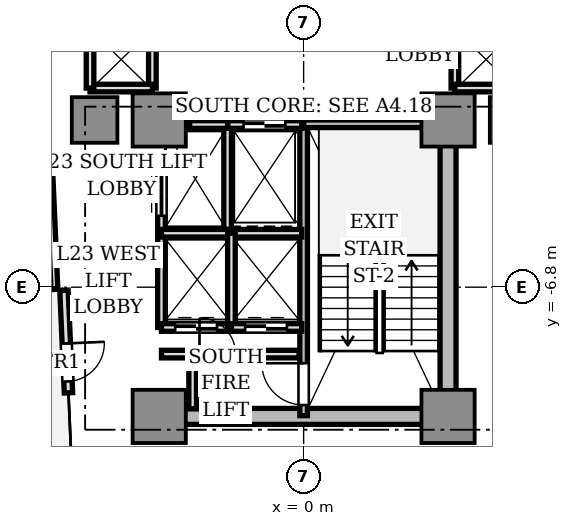
"""IFC4 building model, lengths in metres.
Left out: names, types, materials, properties, quantities, classifications, styles, units other than length and angle.
Written with IfcOpenShell. Run it as: python <this file> out.ifc"""

import sys

from ifc_helpers import new_model, si_unit, direction, frame, frame_2d, origin, origin_2d, place, context, subcontext, project, spatial, rectangle, extrude, source, transform, mapped, element, fill, save


model = new_model("IFC4")
c1 = context("Model", 3, precision=1e-05, world=origin(), true_north=direction((0.0, 1.0)))
c2 = subcontext(c1, "Body", "Model", "MODEL_VIEW")
j1 = project(units=[si_unit("LENGTHUNIT", "METRE"), si_unit("PLANEANGLEUNIT", "RADIAN")], contexts=[c1])
p1 = place(None, origin())
s1 = spatial("IfcSite", under=j1, at=p1, CompositionType="ELEMENT")
p2 = place(p1, origin())
s2 = spatial("IfcBuilding", under=s1, at=p2, CompositionType="ELEMENT")
p3 = place(p2, frame((0.0, 0.0, 86.85)))
s3 = spatial("IfcBuildingStorey", under=s2, at=p3, CompositionType="ELEMENT", Elevation=86.85)
p4 = place(p3, frame((-3.55, -10.2, 0.0), z_axis=(0.0, 0.0, 1.0), x_axis=(1.0, 0.0, 0.0)))
e1 = element("IfcWall", 1, at=p4, inside=s3, PredefinedType="SHEAR", context=c2, shape_type="SweptSolid", body=[
    extrude(rectangle(XDim=7.1, YDim=0.42, at=frame_2d((3.55, 0.0))), origin(), (0.0, 0.0, 1.0), 3.11),
])
p5 = place(p3, frame((3.8, -9.75, 0.0), z_axis=(0.0, 0.0, 1.0), x_axis=(0.0, 1.0, 0.0)))
e2 = element("IfcWall", 2, at=p5, inside=s3, PredefinedType="SHEAR", context=c2, shape_type="SweptSolid", body=[
    extrude(rectangle(XDim=6.9, YDim=0.42, at=frame_2d((3.45, 0.0))), origin(), (0.0, 0.0, 1.0), 3.11),
])
m1 = source(origin(), c2, "Body", "SweptSolid", [
    extrude(rectangle(XDim=1.4, YDim=1.4, at=origin_2d()), origin(), (0.0, 0.0, 1.0), 3.11),
])
for number, where, z_axis, x_axis in (
    (3, (-3.8, -2.4, 0.0), (0.0, 0.0, 1.0), (1.0, 0.0, 0.0)),
    (4, (3.8, -2.4, 0.0), (0.0, 0.0, 1.0), (1.0, 0.0, 0.0)),
    (5, (-3.8, -10.2, 0.0), (0.0, 0.0, 1.0), (1.0, 0.0, 0.0)),
    (6, (3.8, -10.2, 0.0), (0.0, 0.0, 1.0), (1.0, 0.0, 0.0)),
):
    element("IfcColumn", number, at=place(p3, frame(where, z_axis=z_axis, x_axis=x_axis)), inside=s3, PredefinedType="COLUMN", context=c2, shape_type="MappedRepresentation", body=[
        mapped(m1, transform((0.0, 0.0, 0.0), scale=1.0)),
    ])
m2 = source(origin(), c2, "Body", "SweptSolid", [
    extrude(rectangle(XDim=1.2, YDim=1.2, at=origin_2d()), origin(), (0.0, 0.0, 1.0), 3.11),
])
for number, where, z_axis, x_axis in (
    (7, (5.5, -2.4, 0.0), (0.0, 0.0, 1.0), (1.0, 0.0, 0.0)),
    (8, (-5.5, -2.4, 0.0), (0.0, 0.0, 1.0), (1.0, 0.0, 0.0)),
):
    element("IfcColumn", number, at=place(p3, frame(where, z_axis=z_axis, x_axis=x_axis)), inside=s3, PredefinedType="COLUMN", context=c2, shape_type="MappedRepresentation", body=[
        mapped(m2, transform((0.0, 0.0, 0.0), scale=1.0)),
    ])
p6 = place(p3, frame((-6.306, -6.882, 0.0), z_axis=(0.0, 0.0, 1.0), x_axis=(0.043672655174, -0.999045894436, 0.0)))
e9 = element("IfcWall", 9, at=p6, inside=s3, PredefinedType="STANDARD", context=c2, shape_type="SweptSolid", body=[
    extrude(rectangle(XDim=2.7, YDim=0.22, at=frame_2d((1.35, 0.0))), origin(), (0.0, 0.0, 1.0), 3.11),
])
p7 = place(p6, frame((1.4, 0.0, 0.0)))
e10 = element("IfcOpeningElement", 10, at=p7, cuts=e9, PredefinedType="OPENING", context=c2, shape_type="SweptSolid", body=[
    extrude(rectangle(XDim=1.0, YDim=2.2, at=frame_2d((0.5, 1.1))), frame((0.0, 0.12, 0.0), z_axis=(0.0, -1.0, 0.0), x_axis=(1.0, 0.0, 0.0)), (0.0, 0.0, 1.0), 0.24),
])
p8 = place(p3, frame((0.0, -10.18, 0.0), z_axis=(0.0, 0.0, 1.0), x_axis=(0.0, 1.0, 0.0)))
e11 = element("IfcWall", 11, at=p8, inside=s3, PredefinedType="SOLIDWALL", context=c2, shape_type="SweptSolid", body=[
    extrude(rectangle(XDim=7.68, YDim=0.2, at=frame_2d((3.84, 0.0))), origin(), (0.0, 0.0, 1.0), 3.11),
])
p9 = place(p8, frame((0.28, 0.0, 0.0)))
e12 = element("IfcOpeningElement", 12, at=p9, cuts=e11, PredefinedType="OPENING", context=c2, shape_type="SweptSolid", body=[
    extrude(rectangle(XDim=1.1, YDim=2.15, at=frame_2d((0.55, 1.075))), frame((0.0, 0.11, 0.0), z_axis=(0.0, -1.0, 0.0), x_axis=(1.0, 0.0, 0.0)), (0.0, 0.0, 1.0), 0.22),
])
p10 = place(p3, frame((0.0, -2.5, 0.0), z_axis=(0.0, 0.0, 1.0), x_axis=(1.0, 0.0, 0.0)))
e13 = element("IfcWall", 13, at=p10, inside=s3, PredefinedType="SOLIDWALL", context=c2, shape_type="SweptSolid", body=[
    extrude(rectangle(XDim=3.72, YDim=0.2, at=frame_2d((1.86, 0.0))), origin(), (0.0, 0.0, 1.0), 3.11),
])
p11 = place(p3, frame((-2.0, -5.28, 0.0), z_axis=(0.0, 0.0, 1.0), x_axis=(0.0, 1.0, 0.0)))
e14 = element("IfcWall", 14, at=p11, inside=s3, PredefinedType="SOLIDWALL", context=c2, shape_type="SweptSolid", body=[
    extrude(rectangle(XDim=2.78, YDim=0.2, at=frame_2d((1.39, 0.0))), origin(), (0.0, 0.0, 1.0), 2.66),
])
p12 = place(p3, frame((-2.0, -2.52, 0.0), z_axis=(0.0, 0.0, 1.0), x_axis=(1.0, 0.0, 0.0)))
e15 = element("IfcWall", 15, at=p12, inside=s3, PredefinedType="SOLIDWALL", context=c2, shape_type="SweptSolid", body=[
    extrude(rectangle(XDim=1.95, YDim=0.2, at=frame_2d((0.975, 0.0))), origin(), (0.0, 0.0, 1.0), 2.66),
])
p13 = place(p12, frame((0.42, 0.0, 0.0)))
e16 = element("IfcOpeningElement", 16, at=p13, cuts=e15, PredefinedType="OPENING", context=c2, shape_type="SweptSolid", body=[
    extrude(rectangle(XDim=1.1, YDim=2.2, at=frame_2d((0.55, 1.1))), frame((0.0, 0.11, 0.0), z_axis=(0.0, -1.0, 0.0), x_axis=(1.0, 0.0, 0.0)), (0.0, 0.0, 1.0), 0.22),
])
p14 = place(p3, frame((-3.0, -2.52, 0.0), z_axis=(0.0, 0.0, 1.0), x_axis=(1.0, 0.0, 0.0)))
e17 = element("IfcWall", 17, at=p14, inside=s3, PredefinedType="SOLIDWALL", context=c2, shape_type="SweptSolid", body=[
    extrude(rectangle(XDim=1.0, YDim=0.2, at=frame_2d((0.5, 0.0))), origin(), (0.0, 0.0, 1.0), 2.66),
])
p15 = place(p3, frame((-3.74, -5.36, 0.0), z_axis=(0.0, 0.0, 1.0), x_axis=(0.0, 1.0, 0.0)))
e18 = element("IfcWall", 18, at=p15, inside=s3, PredefinedType="SOLIDWALL", context=c2, shape_type="SweptSolid", body=[
    extrude(rectangle(XDim=2.08, YDim=0.2, at=frame_2d((1.04, 0.0))), origin(), (0.0, 0.0, 1.0), 2.66),
])
p16 = place(p15, frame((0.44, 0.0, 0.0)))
e19 = element("IfcOpeningElement", 19, at=p16, cuts=e18, PredefinedType="OPENING", context=c2, shape_type="SweptSolid", body=[
    extrude(rectangle(XDim=1.2, YDim=2.2, at=frame_2d((0.6, 1.1))), frame((0.0, 0.11, 0.0), z_axis=(0.0, -1.0, 0.0), x_axis=(1.0, 0.0, 0.0)), (0.0, 0.0, 1.0), 0.22),
])
p17 = place(p3, frame((-3.74, -7.86, 0.0), z_axis=(0.0, 0.0, 1.0), x_axis=(0.0, 1.0, 0.0)))
e20 = element("IfcWall", 20, at=p17, inside=s3, PredefinedType="SOLIDWALL", context=c2, shape_type="SweptSolid", body=[
    extrude(rectangle(XDim=2.48, YDim=0.2, at=frame_2d((1.24, 0.0))), origin(), (0.0, 0.0, 1.0), 2.66),
])
p18 = place(p3, frame((-3.74, -7.86, 0.0), z_axis=(0.0, 0.0, 1.0), x_axis=(1.0, 0.0, 0.0)))
e21 = element("IfcWall", 21, at=p18, inside=s3, PredefinedType="SOLIDWALL", context=c2, shape_type="SweptSolid", body=[
    extrude(rectangle(XDim=1.84, YDim=0.2, at=frame_2d((0.92, 0.0))), origin(), (0.0, 0.0, 1.0), 2.66),
])
p19 = place(p18, frame((0.36, 0.0, 0.0)))
e22 = element("IfcOpeningElement", 22, at=p19, cuts=e21, PredefinedType="OPENING", context=c2, shape_type="SweptSolid", body=[
    extrude(rectangle(XDim=1.1, YDim=2.2, at=frame_2d((0.55, 1.1))), frame((0.0, 0.11, 0.0), z_axis=(0.0, -1.0, 0.0), x_axis=(1.0, 0.0, 0.0)), (0.0, 0.0, 1.0), 0.22),
])
p20 = place(p3, frame((-3.74, -5.38, 0.0), z_axis=(0.0, 0.0, 1.0), x_axis=(1.0, 0.0, 0.0)))
e23 = element("IfcWall", 23, at=p20, inside=s3, PredefinedType="SOLIDWALL", context=c2, shape_type="SweptSolid", body=[
    extrude(rectangle(XDim=3.69, YDim=0.2, at=frame_2d((1.845, 0.0))), origin(), (0.0, 0.0, 1.0), 2.66),
])
p21 = place(p3, frame((-1.9, -7.86, 0.0), z_axis=(0.0, 0.0, 1.0), x_axis=(0.0, 1.0, 0.0)))
e24 = element("IfcWall", 24, at=p21, inside=s3, PredefinedType="SOLIDWALL", context=c2, shape_type="SweptSolid", body=[
    extrude(rectangle(XDim=2.48, YDim=0.2, at=frame_2d((1.24, 0.0))), origin(), (0.0, 0.0, 1.0), 2.66),
])
p22 = place(p3, frame((-1.9, -7.86, 0.0), z_axis=(0.0, 0.0, 1.0), x_axis=(1.0, 0.0, 0.0)))
e25 = element("IfcWall", 25, at=p22, inside=s3, PredefinedType="SOLIDWALL", context=c2, shape_type="SweptSolid", body=[
    extrude(rectangle(XDim=1.85, YDim=0.2, at=frame_2d((0.925, 0.0))), origin(), (0.0, 0.0, 1.0), 2.66),
])
p23 = place(p22, frame((0.36, 0.0, 0.0)))
e26 = element("IfcOpeningElement", 26, at=p23, cuts=e25, PredefinedType="OPENING", context=c2, shape_type="SweptSolid", body=[
    extrude(rectangle(XDim=1.1, YDim=2.2, at=frame_2d((0.55, 1.1))), frame((0.0, 0.11, 0.0), z_axis=(0.0, -1.0, 0.0), x_axis=(1.0, 0.0, 0.0)), (0.0, 0.0, 1.0), 0.22),
])
p24 = place(p3, frame((3.98, -1.56, 0.0), z_axis=(0.0, 0.0, 1.0), x_axis=(0.0, 1.0, 0.0)))
e27 = element("IfcWall", 27, at=p24, inside=s3, PredefinedType="SOLIDWALL", context=c2, shape_type="SweptSolid", body=[
    extrude(rectangle(XDim=3.12, YDim=0.2, at=frame_2d((1.56, 0.0))), origin(), (0.0, 0.0, 1.0), 2.28),
])
p25 = place(p3, frame((3.98, -1.56, 0.0), z_axis=(0.0, 0.0, 1.0), x_axis=(1.0, 0.0, 0.0)))
e28 = element("IfcWall", 28, at=p25, inside=s3, PredefinedType="SOLIDWALL", context=c2, shape_type="SweptSolid", body=[
    extrude(rectangle(XDim=1.64, YDim=0.2, at=frame_2d((0.82, 0.0))), origin(), (0.0, 0.0, 1.0), 2.66),
])
p26 = place(p3, frame((-3.98, -1.56, 0.0), z_axis=(0.0, 0.0, 1.0), x_axis=(0.0, 1.0, 0.0)))
e29 = element("IfcWall", 29, at=p26, inside=s3, PredefinedType="SOLIDWALL", context=c2, shape_type="SweptSolid", body=[
    extrude(rectangle(XDim=3.12, YDim=0.2, at=frame_2d((1.56, 0.0))), origin(), (0.0, 0.0, 1.0), 2.28),
])
p27 = place(p3, frame((-5.62, -1.56, 0.0), z_axis=(0.0, 0.0, 1.0), x_axis=(1.0, 0.0, 0.0)))
e30 = element("IfcWall", 30, at=p27, inside=s3, PredefinedType="SOLIDWALL", context=c2, shape_type="SweptSolid", body=[
    extrude(rectangle(XDim=1.64, YDim=0.2, at=frame_2d((0.82, 0.0))), origin(), (0.0, 0.0, 1.0), 2.66),
])
p28 = place(p3, frame((-5.62, -1.56, 0.0), z_axis=(0.0, 0.0, 1.0), x_axis=(0.0, 1.0, 0.0)))
e31 = element("IfcWall", 31, at=p28, inside=s3, PredefinedType="SOLIDWALL", context=c2, shape_type="SweptSolid", body=[
    extrude(rectangle(XDim=1.56, YDim=0.2, at=frame_2d((0.78, 0.0))), origin(), (0.0, 0.0, 1.0), 2.66),
])
p29 = place(p3, frame((-3.74, -8.56, 0.0), z_axis=(0.0, 0.0, 1.0), x_axis=(1.0, 0.0, 0.0)))
e32 = element("IfcWall", 32, at=p29, inside=s3, PredefinedType="SOLIDWALL", context=c2, shape_type="SweptSolid", body=[
    extrude(rectangle(XDim=3.62, YDim=0.2, at=frame_2d((1.81, 0.0))), origin(), (0.0, 0.0, 1.0), 2.66),
])
p30 = place(p29, frame((1.0, 0.0, 0.0)))
e33 = element("IfcOpeningElement", 33, at=p30, cuts=e32, PredefinedType="OPENING", context=c2, shape_type="SweptSolid", body=[
    extrude(rectangle(XDim=0.95, YDim=2.15, at=frame_2d((0.475, 1.075))), frame((0.0, 0.11, 0.0), z_axis=(0.0, -1.0, 0.0), x_axis=(1.0, 0.0, 0.0)), (0.0, 0.0, 1.0), 0.22),
])
p31 = place(p3, frame((-2.92, -10.0, 0.0), z_axis=(0.0, 0.0, 1.0), x_axis=(0.0, 1.0, 0.0)))
e34 = element("IfcWall", 34, at=p31, inside=s3, PredefinedType="SOLIDWALL", context=c2, shape_type="SweptSolid", body=[
    extrude(rectangle(XDim=1.44, YDim=0.2, at=frame_2d((0.72, 0.0))), origin(), (0.0, 0.0, 1.0), 2.66),
])
p32 = place(p3, frame((-6.71, -3.346, 0.0), z_axis=(0.0, 0.0, 1.0), x_axis=(0.043597663116, -0.999049169846, 0.0)))
e35 = element("IfcWall", 35, at=p32, inside=s3, PredefinedType="PARTITIONING", context=c2, shape_type="SweptSolid", body=[
    extrude(rectangle(XDim=3.5, YDim=0.18, at=frame_2d((1.75, 0.0))), origin(), (0.0, 0.0, 1.0), 2.66),
])
p33 = place(p3, frame((-3.851, -11.529, 0.0), z_axis=(0.0, 0.0, 1.0), x_axis=(0.999048663393, 0.043609267053, 0.0)))
e36 = element("IfcWall", 36, at=p33, inside=s3, PredefinedType="PARTITIONING", context=c2, shape_type="SweptSolid", body=[
    extrude(rectangle(XDim=10.9, YDim=0.18, at=frame_2d((5.45, 0.0))), origin(), (0.0, 0.0, 1.0), 2.66),
])
m3 = source(origin(), c2, "Body", "SweptSolid", [
    extrude(rectangle(XDim=1.0, YDim=0.05, at=origin_2d()), origin(), (0.0, 0.0, 1.0), 2.2),
])
p34 = place(p7, frame((0.5, 0.0, 0.0)))
e37 = element("IfcDoor", 37, at=p34, inside=s3, OperationType="SINGLE_SWING_LEFT", PredefinedType="DOOR", context=c2, shape_type="MappedRepresentation", body=[
    mapped(m3, transform((0.0, 0.0, 0.0), scale=1.0)),
])
fill(e10, e37)
m4 = source(origin(), c2, "Body", "SweptSolid", [
    extrude(rectangle(XDim=1.1, YDim=0.05, at=origin_2d()), origin(), (0.0, 0.0, 1.0), 2.2),
])
p35 = place(p13, frame((0.55, 0.0, 0.0)))
e38 = element("IfcDoor", 38, at=p35, inside=s3, OperationType="DOUBLE_DOOR_SLIDING", PredefinedType="DOOR", context=c2, shape_type="MappedRepresentation", body=[
    mapped(m4, transform((0.0, 0.0, 0.0), scale=1.0)),
])
fill(e16, e38)
m5 = source(origin(), c2, "Body", "SweptSolid", [
    extrude(rectangle(XDim=1.2, YDim=0.05, at=origin_2d()), origin(), (0.0, 0.0, 1.0), 2.2),
])
p36 = place(p16, frame((0.6, 0.0, 0.0)))
e39 = element("IfcDoor", 39, at=p36, inside=s3, OperationType="DOUBLE_DOOR_SLIDING", PredefinedType="DOOR", context=c2, shape_type="MappedRepresentation", body=[
    mapped(m5, transform((0.0, 0.0, 0.0), scale=1.0)),
])
fill(e19, e39)
p37 = place(p19, frame((0.55, 0.0, 0.0)))
e40 = element("IfcDoor", 40, at=p37, inside=s3, OperationType="DOUBLE_DOOR_SLIDING", PredefinedType="DOOR", context=c2, shape_type="MappedRepresentation", body=[
    mapped(m4, transform((0.0, 0.0, 0.0), scale=1.0)),
])
fill(e22, e40)
p38 = place(p23, frame((0.55, 0.0, 0.0)))
e41 = element("IfcDoor", 41, at=p38, inside=s3, OperationType="DOUBLE_DOOR_SLIDING", PredefinedType="DOOR", context=c2, shape_type="MappedRepresentation", body=[
    mapped(m4, transform((0.0, 0.0, 0.0), scale=1.0)),
])
fill(e26, e41)
m6 = source(origin(), c2, "Body", "SweptSolid", [
    extrude(rectangle(XDim=1.1, YDim=0.05, at=origin_2d()), origin(), (0.0, 0.0, 1.0), 2.15),
])
p39 = place(p9, frame((0.55, 0.0, 0.0)))
e42 = element("IfcDoor", 42, at=p39, inside=s3, OperationType="SINGLE_SWING_RIGHT", PredefinedType="DOOR", context=c2, shape_type="MappedRepresentation", body=[
    mapped(m6, transform((0.0, 0.0, 0.0), scale=1.0)),
])
fill(e12, e42)
m7 = source(origin(), c2, "Body", "SweptSolid", [
    extrude(rectangle(XDim=0.95, YDim=0.05, at=origin_2d()), origin(), (0.0, 0.0, 1.0), 2.15),
])
p40 = place(p30, frame((0.475, 0.0, 0.0)))
e43 = element("IfcDoor", 43, at=p40, inside=s3, OperationType="SINGLE_SWING_LEFT", PredefinedType="DOOR", context=c2, shape_type="MappedRepresentation", body=[
    mapped(m7, transform((0.0, 0.0, 0.0), scale=1.0)),
])
fill(e33, e43)
save(model, sys.argv[1])
